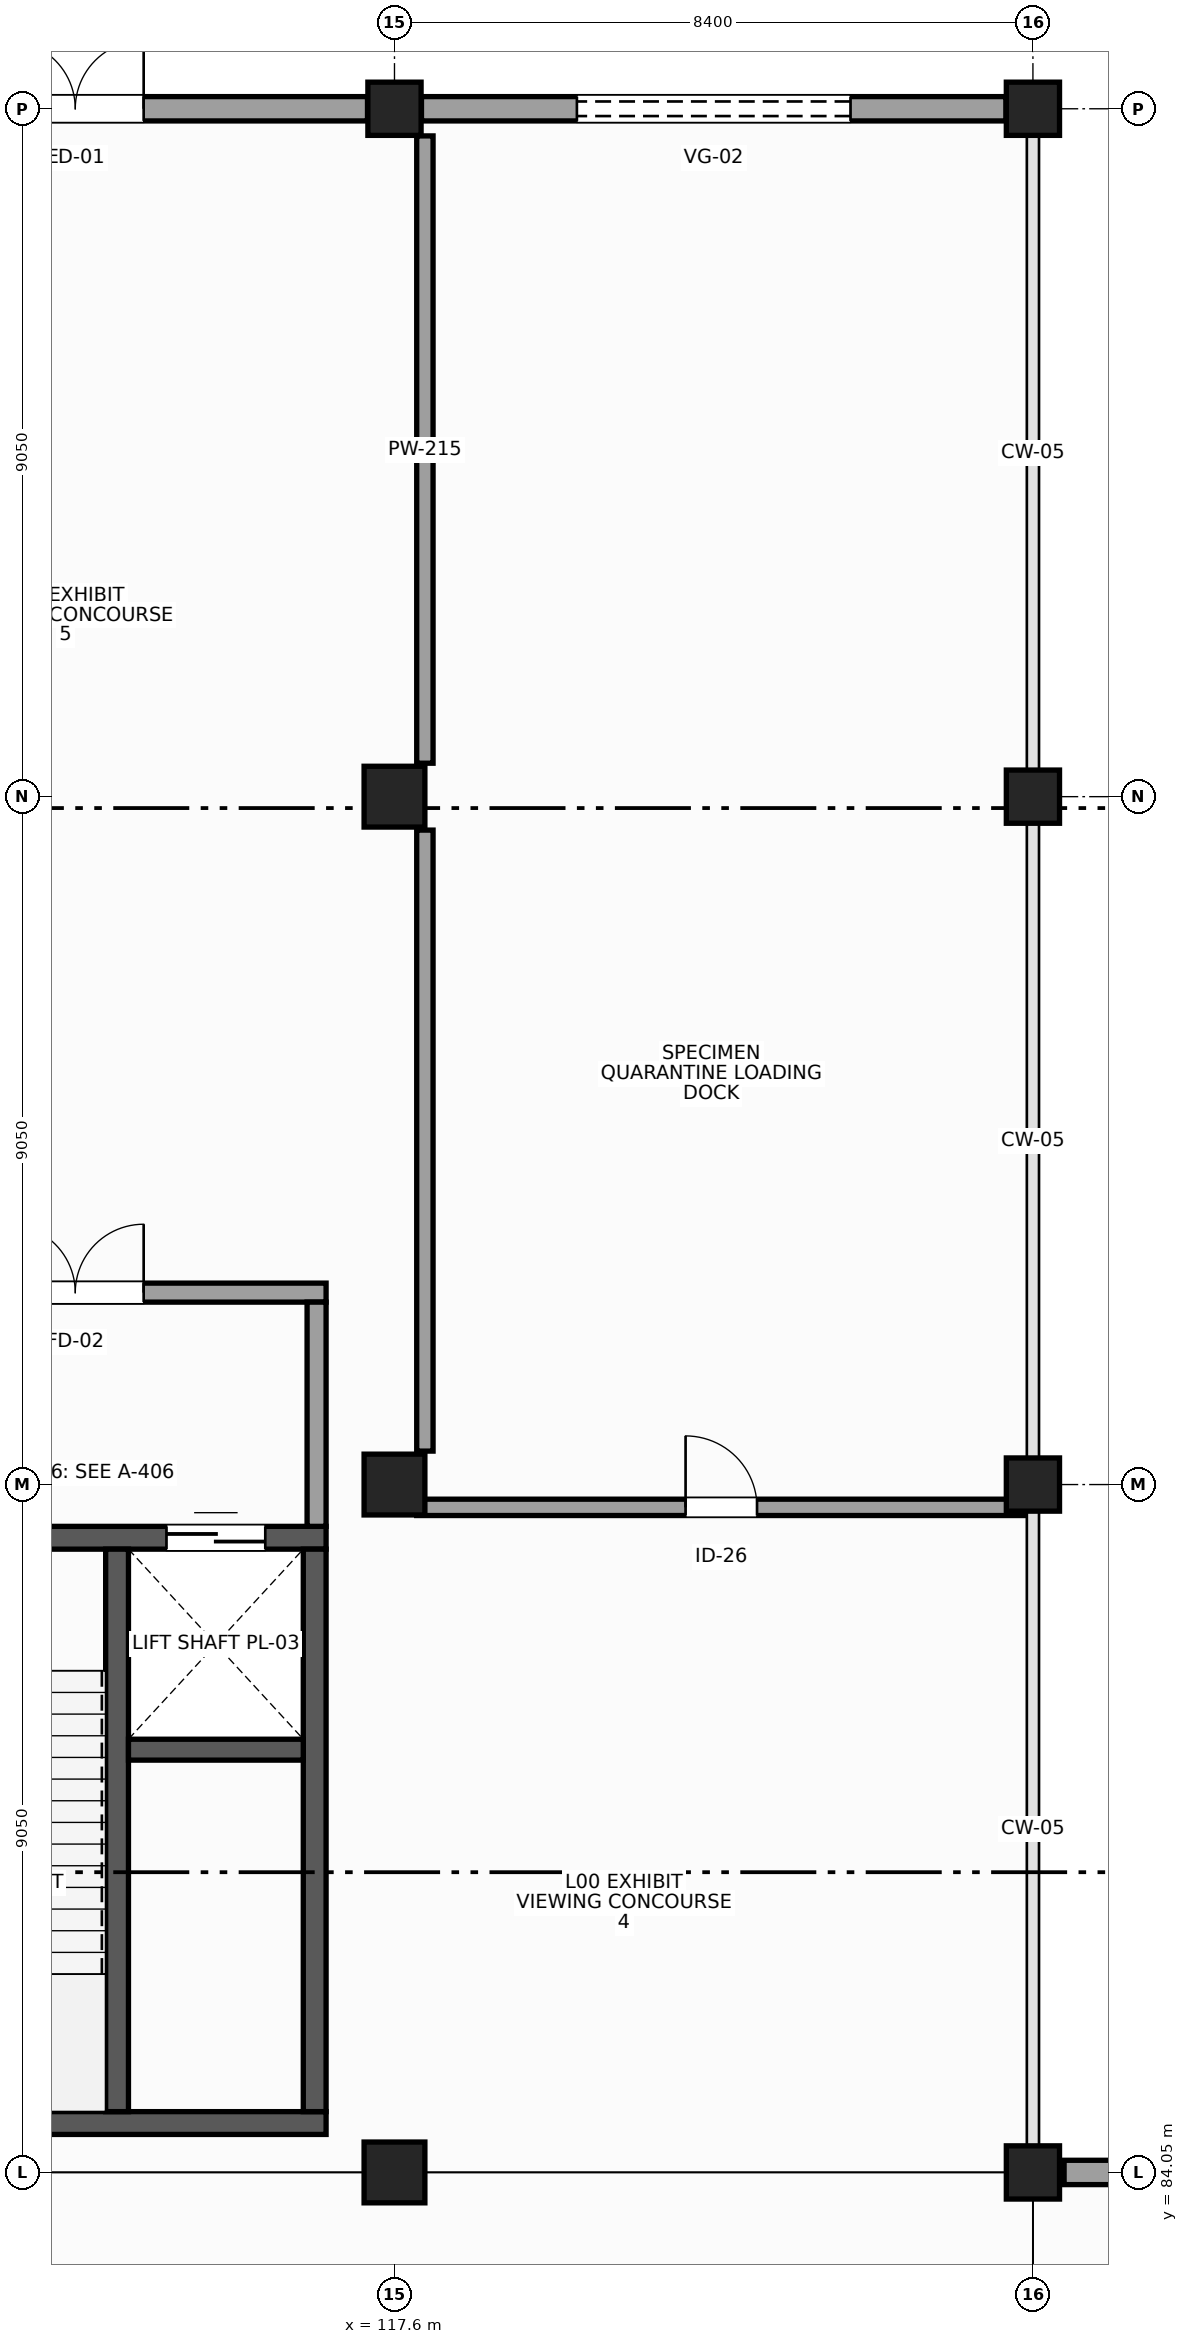
"""IFC4 building model, lengths in metres.
Left out: names, types, materials, properties, quantities, classifications, styles, units other than length and angle.
Written with IfcOpenShell. Run it as: python <this file> out.ifc"""

import sys

from ifc_helpers import new_model, si_unit, direction, frame, frame_2d, origin, origin_2d, place, context, subcontext, project, spatial, rectangle, extrude, element, fill, save


model = new_model("IFC4")
c1 = context("Model", 3, precision=1e-05, world=origin(), true_north=direction((0.0, 1.0)))
c2 = subcontext(c1, "Body", "Model", "MODEL_VIEW")
j1 = project(units=[si_unit("LENGTHUNIT", "METRE"), si_unit("PLANEANGLEUNIT", "RADIAN")], contexts=[c1])
p1 = place(None, origin())
s1 = spatial("IfcSite", under=j1, at=p1, CompositionType="ELEMENT")
p2 = place(p1, origin())
s2 = spatial("IfcBuilding", under=s1, at=p2, CompositionType="ELEMENT")
p3 = place(p2, origin())
s3 = spatial("IfcBuildingStorey", under=s2, at=p3, CompositionType="ELEMENT", Elevation=0.0)
for number, where, z_axis, x_axis in (
    (1, (117.6, 84.05, 0.0), (0.0, 0.0, 1.0), (1.0, 0.0, 0.0)),
    (2, (117.6, 93.1, 0.0), (0.0, 0.0, 1.0), (1.0, 0.0, 0.0)),
    (3, (117.6, 102.15, 0.0), (0.0, 0.0, 1.0), (1.0, 0.0, 0.0)),
):
    element("IfcColumn", number, at=place(p3, frame(where, z_axis=z_axis, x_axis=x_axis)), inside=s3, PredefinedType="COLUMN", context=c2, shape_type="SweptSolid", body=[
        extrude(rectangle(XDim=0.8, YDim=0.8, at=origin_2d()), origin(), (0.0, 0.0, 1.0), 5.4),
    ])
for number, where, z_axis, x_axis in (
    (4, (117.6, 111.2, 0.0), (0.0, 0.0, 1.0), (1.0, 0.0, 0.0)),
    (5, (126.0, 84.05, 0.0), (0.0, 0.0, 1.0), (1.0, 0.0, 0.0)),
    (6, (126.0, 93.1, 0.0), (0.0, 0.0, 1.0), (1.0, 0.0, 0.0)),
    (7, (126.0, 102.15, 0.0), (0.0, 0.0, 1.0), (1.0, 0.0, 0.0)),
    (8, (126.0, 111.2, 0.0), (0.0, 0.0, 1.0), (1.0, 0.0, 0.0)),
):
    element("IfcColumn", number, at=place(p3, frame(where, z_axis=z_axis, x_axis=x_axis)), inside=s3, PredefinedType="COLUMN", context=c2, shape_type="SweptSolid", body=[
        extrude(rectangle(XDim=0.7, YDim=0.7, at=origin_2d()), origin(), (0.0, 0.0, 1.0), 5.4),
    ])
p4 = place(p3, frame((125.645, 111.2, 0.0), z_axis=(0.0, 0.0, 1.0), x_axis=(-1.0, 0.0, 0.0)))
e9 = element("IfcWall", 9, at=p4, inside=s3, PredefinedType="STANDARD", context=c2, shape_type="SweptSolid", body=[
    extrude(rectangle(XDim=7.69, YDim=0.32, at=frame_2d((3.845, 0.0))), origin(), (0.0, 0.0, 1.0), 4.531),
])
p5 = place(p4, frame((2.045, 0.0, 0.0)))
e10 = element("IfcOpeningElement", 10, at=p5, cuts=e9, PredefinedType="OPENING", context=c2, shape_type="SweptSolid", body=[
    extrude(rectangle(XDim=3.6, YDim=3.4, at=frame_2d((1.8, 1.7))), frame((0.0, 0.17, 0.0), z_axis=(0.0, -1.0, 0.0), x_axis=(1.0, 0.0, 0.0)), (0.0, 0.0, 1.0), 0.34),
])
p6 = place(p3, frame((117.245, 111.2, 0.0), z_axis=(0.0, 0.0, 1.0), x_axis=(-1.0, 0.0, 0.0)))
e11 = element("IfcWall", 11, at=p6, inside=s3, PredefinedType="STANDARD", context=c2, shape_type="SweptSolid", body=[
    extrude(rectangle(XDim=7.69, YDim=0.32, at=frame_2d((3.845, 0.0))), origin(), (0.0, 0.0, 1.0), 4.531),
])
p7 = place(p6, frame((2.945, 0.0, 0.0)))
e12 = element("IfcOpeningElement", 12, at=p7, cuts=e11, PredefinedType="OPENING", context=c2, shape_type="SweptSolid", body=[
    extrude(rectangle(XDim=1.8, YDim=2.4, at=frame_2d((0.9, 1.2))), frame((0.0, 0.17, 0.0), z_axis=(0.0, -1.0, 0.0), x_axis=(1.0, 0.0, 0.0)), (0.0, 0.0, 1.0), 0.34),
])
p8 = place(p3, frame((133.99, 84.05, 0.0), z_axis=(0.0, 0.0, 1.0), x_axis=(-1.0, 0.0, 0.0)))
e13 = element("IfcWall", 13, at=p8, inside=s3, PredefinedType="STANDARD", context=c2, shape_type="SweptSolid", body=[
    extrude(rectangle(XDim=7.58, YDim=0.32, at=frame_2d((3.79, 0.0))), origin(), (0.0, 0.0, 1.0), 4.23),
])
p9 = place(p3, frame((110.1, 84.7, 0.0), z_axis=(0.0, 0.0, 1.0), x_axis=(1.0, 0.0, 0.0)))
e14 = element("IfcWall", 14, at=p9, inside=s3, PredefinedType="SHEAR", context=c2, shape_type="SweptSolid", body=[
    extrude(rectangle(XDim=6.6, YDim=0.3, at=frame_2d((3.3, 0.0))), origin(), (0.0, 0.0, 1.0), 5.09),
])
p10 = place(p3, frame((110.1, 92.4, 0.0), z_axis=(0.0, 0.0, 1.0), x_axis=(1.0, 0.0, 0.0)))
e15 = element("IfcWall", 15, at=p10, inside=s3, PredefinedType="SHEAR", context=c2, shape_type="SweptSolid", body=[
    extrude(rectangle(XDim=6.6, YDim=0.3, at=frame_2d((3.3, 0.0))), origin(), (0.0, 0.0, 1.0), 5.09),
])
p11 = place(p10, frame((1.425, 0.0, 0.0)))
e16 = element("IfcOpeningElement", 16, at=p11, cuts=e15, PredefinedType="OPENING", context=c2, shape_type="SweptSolid", body=[
    extrude(rectangle(XDim=1.15, YDim=2.2, at=frame_2d((0.575, 1.1))), frame((0.0, 0.16, 0.0), z_axis=(0.0, -1.0, 0.0), x_axis=(1.0, 0.0, 0.0)), (0.0, 0.0, 1.0), 0.32),
])
p12 = place(p10, frame((4.5, 0.0, 0.0)))
e17 = element("IfcOpeningElement", 17, at=p12, cuts=e15, PredefinedType="OPENING", context=c2, shape_type="SweptSolid", body=[
    extrude(rectangle(XDim=1.3, YDim=2.2, at=frame_2d((0.65, 1.1))), frame((0.0, 0.16, 0.0), z_axis=(0.0, -1.0, 0.0), x_axis=(1.0, 0.0, 0.0)), (0.0, 0.0, 1.0), 0.32),
])
for number, where, z_axis, x_axis in (
    (18, (116.55, 84.85, 0.0), (0.0, 0.0, 1.0), (0.0, 1.0, 0.0)),
    (19, (113.95, 84.85, 0.0), (0.0, 0.0, 1.0), (0.0, 1.0, 0.0)),
):
    element("IfcWall", number, at=place(p3, frame(where, z_axis=z_axis, x_axis=x_axis)), inside=s3, PredefinedType="SHEAR", context=c2, shape_type="SweptSolid", body=[
        extrude(rectangle(XDim=7.4, YDim=0.3, at=frame_2d((3.7, 0.0))), origin(), (0.0, 0.0, 1.0), 5.09),
    ])
p13 = place(p3, frame((114.1, 89.612, 0.0), z_axis=(0.0, 0.0, 1.0), x_axis=(1.0, 0.0, 0.0)))
e20 = element("IfcWall", 20, at=p13, inside=s3, PredefinedType="SHEAR", context=c2, shape_type="SweptSolid", body=[
    extrude(rectangle(XDim=2.3, YDim=0.275, at=frame_2d((1.15, 0.0))), origin(), (0.0, 0.0, 1.0), 5.09),
])
p14 = place(p3, frame((110.1, 95.625, 0.0), z_axis=(0.0, 0.0, 1.0), x_axis=(1.0, 0.0, 0.0)))
e21 = element("IfcWall", 21, at=p14, inside=s3, PredefinedType="PARTITIONING", context=c2, shape_type="SweptSolid", body=[
    extrude(rectangle(XDim=6.6, YDim=0.25, at=frame_2d((3.3, 0.0))), origin(), (0.0, 0.0, 1.0), 5.09),
])
p15 = place(p14, frame((2.4, 0.0, 0.0)))
e22 = element("IfcOpeningElement", 22, at=p15, cuts=e21, PredefinedType="OPENING", context=c2, shape_type="SweptSolid", body=[
    extrude(rectangle(XDim=1.8, YDim=2.25, at=frame_2d((0.9, 1.125))), frame((0.0, 0.135, 0.0), z_axis=(0.0, -1.0, 0.0), x_axis=(1.0, 0.0, 0.0)), (0.0, 0.0, 1.0), 0.27),
])
p16 = place(p3, frame((116.575, 92.55, 0.0), z_axis=(0.0, 0.0, 1.0), x_axis=(0.0, 1.0, 0.0)))
e23 = element("IfcWall", 23, at=p16, inside=s3, PredefinedType="PARTITIONING", context=c2, shape_type="SweptSolid", body=[
    extrude(rectangle(XDim=2.95, YDim=0.25, at=frame_2d((1.475, 0.0))), origin(), (0.0, 0.0, 1.0), 4.23),
])
p17 = place(p3, frame((117.892, 92.8, 0.0), z_axis=(0.0, 0.0, 1.0), x_axis=(1.0, 0.0, 0.0)))
e24 = element("IfcWall", 24, at=p17, inside=s3, PredefinedType="PARTITIONING", context=c2, shape_type="SweptSolid", body=[
    extrude(rectangle(XDim=8.015, YDim=0.215, at=frame_2d((4.007, 0.0))), origin(), (0.0, 0.0, 1.0), 2.617),
])
p18 = place(p17, frame((3.538, 0.0, 0.0)))
e25 = element("IfcOpeningElement", 25, at=p18, cuts=e24, PredefinedType="OPENING", context=c2, shape_type="SweptSolid", body=[
    extrude(rectangle(XDim=0.94, YDim=2.14, at=frame_2d((0.47, 1.07))), frame((0.0, 0.118, 0.0), z_axis=(0.0, -1.0, 0.0), x_axis=(1.0, 0.0, 0.0)), (0.0, 0.0, 1.0), 0.235),
])
p19 = place(p3, frame((118.0, 93.54, 0.0), z_axis=(0.0, 0.0, 1.0), x_axis=(0.0, 1.0, 0.0)))
e26 = element("IfcWall", 26, at=p19, inside=s3, PredefinedType="PARTITIONING", context=c2, shape_type="SweptSolid", body=[
    extrude(rectangle(XDim=8.17, YDim=0.215, at=frame_2d((4.085, 0.0))), origin(), (0.0, 0.0, 1.0), 5.09),
])
p20 = place(p3, frame((118.0, 102.59, 0.0), z_axis=(0.0, 0.0, 1.0), x_axis=(0.0, 1.0, 0.0)))
e27 = element("IfcWall", 27, at=p20, inside=s3, PredefinedType="PARTITIONING", context=c2, shape_type="SweptSolid", body=[
    extrude(rectangle(XDim=8.253, YDim=0.215, at=frame_2d((4.126, 0.0))), origin(), (0.0, 0.0, 1.0), 5.09),
])
p21 = place(p5, frame((3.6, 0.0, 0.0), z_axis=(0.0, 0.0, 1.0), x_axis=(-1.0, 0.0, 0.0)))
e28 = element("IfcDoor", 28, at=p21, inside=s3, OperationType="ROLLINGUP", PredefinedType="GATE", context=c2, shape_type="SweptSolid", body=[
    extrude(rectangle(XDim=3.6, YDim=3.4, at=frame_2d((1.8, 1.7))), frame((0.0, 0.025, 0.0), z_axis=(0.0, -1.0, 0.0), x_axis=(1.0, 0.0, 0.0)), (0.0, 0.0, 1.0), 0.05),
])
fill(e10, e28)
p22 = place(p7, frame((1.8, 0.0, 0.0), z_axis=(0.0, 0.0, 1.0), x_axis=(-1.0, 0.0, 0.0)))
e29 = element("IfcDoor", 29, at=p22, inside=s3, OperationType="DOUBLE_DOOR_SINGLE_SWING", PredefinedType="DOOR", context=c2, shape_type="SweptSolid", body=[
    extrude(rectangle(XDim=1.8, YDim=2.4, at=frame_2d((0.9, 1.2))), frame((0.0, 0.025, 0.0), z_axis=(0.0, -1.0, 0.0), x_axis=(1.0, 0.0, 0.0)), (0.0, 0.0, 1.0), 0.05),
])
fill(e12, e29)
p23 = place(p12, origin())
e30 = element("IfcDoor", 30, at=p23, inside=s3, OperationType="DOUBLE_DOOR_SLIDING", PredefinedType="DOOR", context=c2, shape_type="SweptSolid", body=[
    extrude(rectangle(XDim=1.3, YDim=2.2, at=frame_2d((0.65, 1.1))), frame((0.0, 0.025, 0.0), z_axis=(0.0, -1.0, 0.0), x_axis=(1.0, 0.0, 0.0)), (0.0, 0.0, 1.0), 0.05),
])
fill(e17, e30)
p24 = place(p15, origin())
e31 = element("IfcDoor", 31, at=p24, inside=s3, OperationType="DOUBLE_DOOR_SINGLE_SWING", PredefinedType="DOOR", context=c2, shape_type="SweptSolid", body=[
    extrude(rectangle(XDim=1.8, YDim=2.25, at=frame_2d((0.9, 1.125))), frame((0.0, 0.025, 0.0), z_axis=(0.0, -1.0, 0.0), x_axis=(1.0, 0.0, 0.0)), (0.0, 0.0, 1.0), 0.05),
])
fill(e22, e31)
p25 = place(p18, origin())
e32 = element("IfcDoor", 32, at=p25, inside=s3, OperationType="SINGLE_SWING_LEFT", PredefinedType="DOOR", context=c2, shape_type="SweptSolid", body=[
    extrude(rectangle(XDim=0.94, YDim=2.14, at=frame_2d((0.47, 1.07))), frame((0.0, 0.025, 0.0), z_axis=(0.0, -1.0, 0.0), x_axis=(1.0, 0.0, 0.0)), (0.0, 0.0, 1.0), 0.05),
])
fill(e25, e32)
save(model, sys.argv[1])
